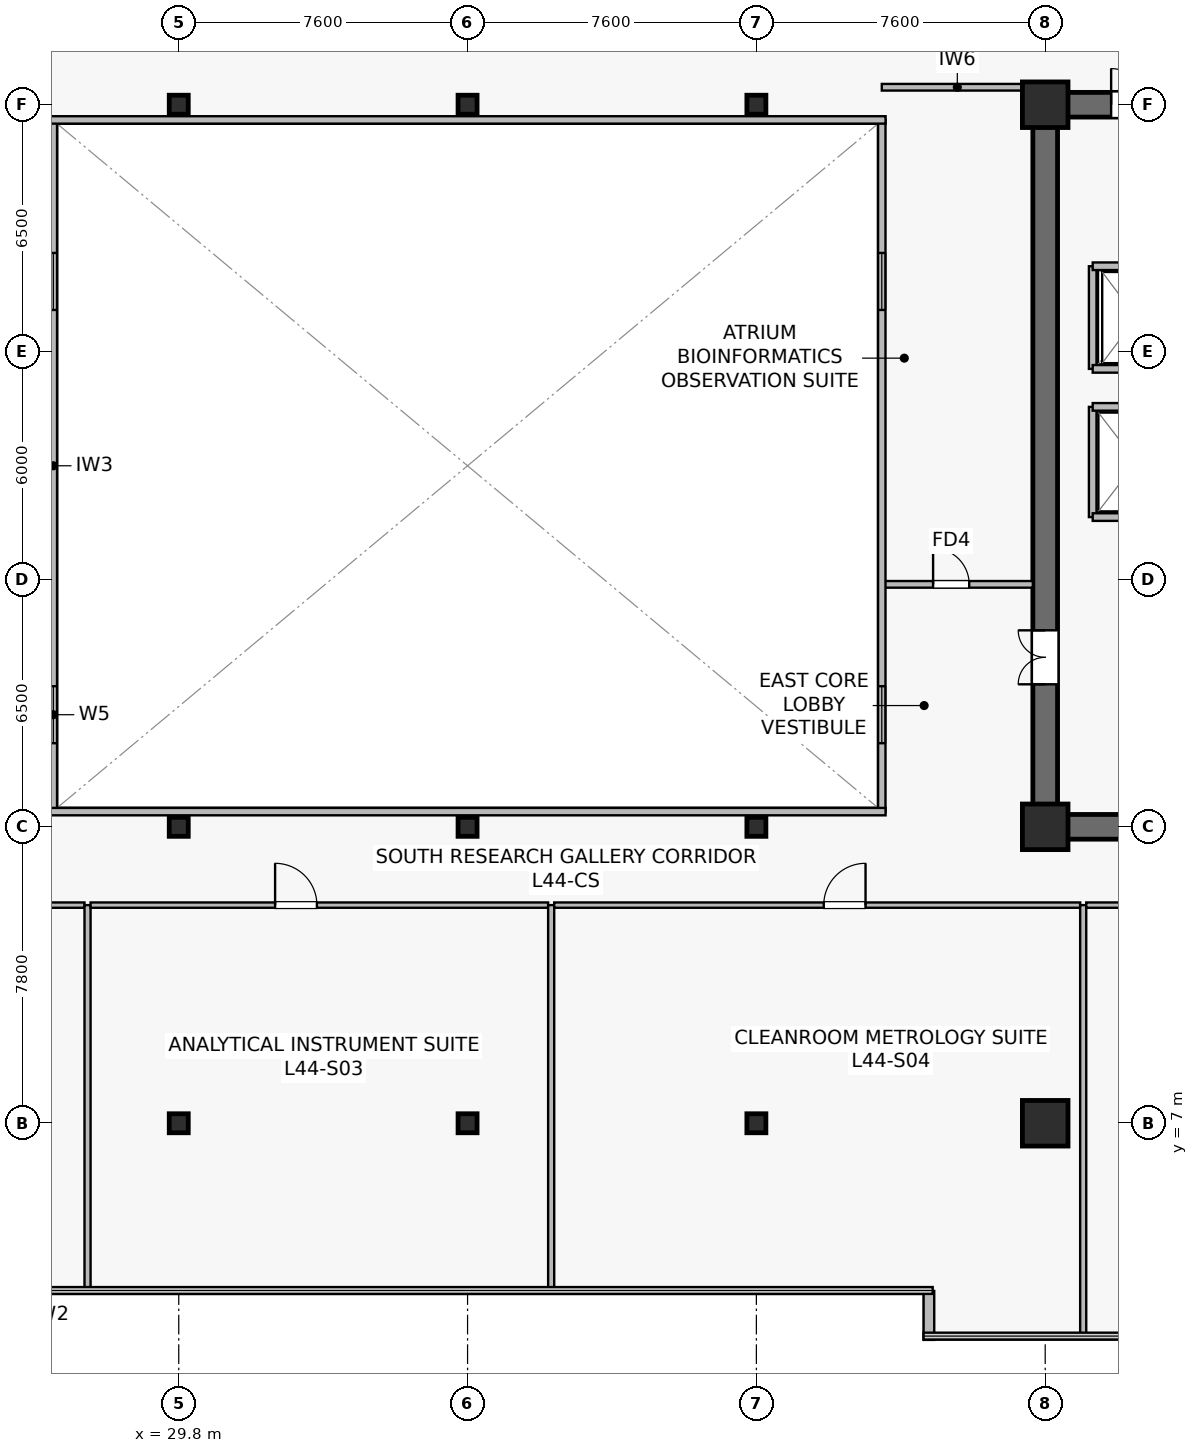
"""IFC4 building model, lengths in metres.
Left out: names, types, materials, properties, quantities, classifications, styles, units other than length and angle.
Written with IfcOpenShell. Run it as: python <this file> out.ifc"""

import sys

from ifc_helpers import new_model, si_unit, direction, frame, frame_2d, origin, origin_2d, place, context, subcontext, project, spatial, rectangle, hollow_rectangle, extrude, source, transform, mapped, element, fill, save


model = new_model("IFC4")
c1 = context("Model", 3, precision=1e-05, world=origin(), true_north=direction((0.0, 1.0)))
c2 = subcontext(c1, "Body", "Model", "MODEL_VIEW")
j1 = project(units=[si_unit("LENGTHUNIT", "METRE"), si_unit("PLANEANGLEUNIT", "RADIAN")], contexts=[c1])
p1 = place(None, origin())
s1 = spatial("IfcSite", under=j1, at=p1, CompositionType="ELEMENT")
p2 = place(p1, origin())
s2 = spatial("IfcBuilding", under=s1, at=p2, CompositionType="ELEMENT")
p3 = place(p2, frame((0.0, 0.0, 183.0)))
s3 = spatial("IfcBuildingStorey", under=s2, at=p3, CompositionType="ELEMENT", Elevation=183.0)
p4 = place(p3, frame((52.275, 14.8, 0.0), z_axis=(0.0, 0.0, 1.0), x_axis=(1.0, 0.0, 0.0)))
e1 = element("IfcWall", 1, at=p4, inside=s3, PredefinedType="SHEAR", context=c2, shape_type="SweptSolid", body=[
    extrude(rectangle(XDim=15.45, YDim=0.65, at=frame_2d((7.725, 0.0))), origin(), (0.0, 0.0, 1.0), 3.79),
])
p5 = place(p3, frame((52.275, 33.8, 0.0), z_axis=(0.0, 0.0, 1.0), x_axis=(1.0, 0.0, 0.0)))
e2 = element("IfcWall", 2, at=p5, inside=s3, PredefinedType="SHEAR", context=c2, shape_type="SweptSolid", body=[
    extrude(rectangle(XDim=15.45, YDim=0.65, at=frame_2d((7.725, 0.0))), origin(), (0.0, 0.0, 1.0), 3.79),
])
p6 = place(p5, frame((8.825, 0.0, 0.0)))
e3 = element("IfcOpeningElement", 3, at=p6, cuts=e2, PredefinedType="OPENING", context=c2, shape_type="SweptSolid", body=[
    extrude(rectangle(XDim=0.95, YDim=2.15, at=frame_2d((0.475, 1.075))), frame((0.0, 0.335, 0.0), z_axis=(0.0, -1.0, 0.0), x_axis=(1.0, 0.0, 0.0)), (0.0, 0.0, 1.0), 0.67),
])
p7 = place(p5, frame((5.46, 0.0, 0.0)))
e4 = element("IfcOpeningElement", 4, at=p7, cuts=e2, PredefinedType="OPENING", context=c2, shape_type="SweptSolid", body=[
    extrude(rectangle(XDim=0.95, YDim=2.15, at=frame_2d((0.475, 1.075))), frame((0.0, 0.335, 0.0), z_axis=(0.0, -1.0, 0.0), x_axis=(1.0, 0.0, 0.0)), (0.0, 0.0, 1.0), 0.67),
])
p8 = place(p5, frame((2.06, 0.0, 0.0)))
e5 = element("IfcOpeningElement", 5, at=p8, cuts=e2, PredefinedType="OPENING", context=c2, shape_type="SweptSolid", body=[
    extrude(rectangle(XDim=0.95, YDim=2.15, at=frame_2d((0.475, 1.075))), frame((0.0, 0.335, 0.0), z_axis=(0.0, -1.0, 0.0), x_axis=(1.0, 0.0, 0.0)), (0.0, 0.0, 1.0), 0.67),
])
p9 = place(p3, frame((52.6, 15.125, 0.0), z_axis=(0.0, 0.0, 1.0), x_axis=(0.0, 1.0, 0.0)))
e6 = element("IfcWall", 6, at=p9, inside=s3, PredefinedType="SHEAR", context=c2, shape_type="SweptSolid", body=[
    extrude(rectangle(XDim=18.35, YDim=0.65, at=frame_2d((9.175, 0.0))), origin(), (0.0, 0.0, 1.0), 3.79),
])
p10 = place(p9, frame((3.425, 0.0, 0.0)))
e7 = element("IfcOpeningElement", 7, at=p10, cuts=e6, PredefinedType="OPENING", context=c2, shape_type="SweptSolid", body=[
    extrude(rectangle(XDim=1.42, YDim=2.2, at=frame_2d((0.71, 1.1))), frame((0.0, 0.335, 0.0), z_axis=(0.0, -1.0, 0.0), x_axis=(1.0, 0.0, 0.0)), (0.0, 0.0, 1.0), 0.67),
])
m1 = source(origin(), c2, "Body", "SweptSolid", [
    extrude(rectangle(XDim=1.2, YDim=1.2, at=origin_2d()), origin(), (0.0, 0.0, 1.0), 4.1),
])
for number, where, z_axis, x_axis in (
    (8, (52.6, 7.0, 0.0), (0.0, 0.0, 1.0), (1.0, 0.0, 0.0)),
    (9, (52.6, 14.8, 0.0), (0.0, 0.0, 1.0), (1.0, 0.0, 0.0)),
    (10, (52.6, 33.8, 0.0), (0.0, 0.0, 1.0), (1.0, 0.0, 0.0)),
):
    element("IfcColumn", number, at=place(p3, frame(where, z_axis=z_axis, x_axis=x_axis)), inside=s3, PredefinedType="COLUMN", context=c2, shape_type="MappedRepresentation", body=[
        mapped(m1, transform((0.0, 0.0, 0.0), scale=1.0)),
    ])
m2 = source(origin(), c2, "Body", "SweptSolid", [
    extrude(hollow_rectangle(XDim=0.5, YDim=0.5, WallThickness=0.022, at=origin_2d()), origin(), (0.0, 0.0, 1.0), 4.1),
])
for number, where, z_axis, x_axis in (
    (11, (29.8, 7.0, 0.0), (0.0, 0.0, 1.0), (1.0, 0.0, 0.0)),
    (12, (29.8, 14.8, 0.0), (0.0, 0.0, 1.0), (1.0, 0.0, 0.0)),
    (13, (29.8, 33.8, 0.0), (0.0, 0.0, 1.0), (1.0, 0.0, 0.0)),
    (14, (37.4, 7.0, 0.0), (0.0, 0.0, 1.0), (1.0, 0.0, 0.0)),
    (15, (37.4, 14.8, 0.0), (0.0, 0.0, 1.0), (1.0, 0.0, 0.0)),
    (16, (37.4, 33.8, 0.0), (0.0, 0.0, 1.0), (1.0, 0.0, 0.0)),
    (17, (45.0, 7.0, 0.0), (0.0, 0.0, 1.0), (1.0, 0.0, 0.0)),
    (18, (45.0, 14.8, 0.0), (0.0, 0.0, 1.0), (1.0, 0.0, 0.0)),
    (19, (45.0, 33.8, 0.0), (0.0, 0.0, 1.0), (1.0, 0.0, 0.0)),
):
    element("IfcColumn", number, at=place(p3, frame(where, z_axis=z_axis, x_axis=x_axis)), inside=s3, PredefinedType="COLUMN", context=c2, shape_type="MappedRepresentation", body=[
        mapped(m2, transform((0.0, 0.0, 0.0), scale=1.0)),
    ])
p11 = place(p3, frame((49.54, 2.588, 0.0), z_axis=(0.0, 0.0, 1.0), x_axis=(0.0, -1.0, 0.0)))
e20 = element("IfcWall", 20, at=p11, inside=s3, PredefinedType="STANDARD", context=c2, shape_type="SweptSolid", body=[
    extrude(rectangle(XDim=1.288, YDim=0.28, at=frame_2d((0.644, 0.0))), origin(), (0.0, 0.0, 1.0), 3.79),
])
p12 = place(p3, frame((53.85, 26.85, 0.0), z_axis=(0.0, 0.0, 1.0), x_axis=(0.0, 1.0, 0.0)))
e21 = element("IfcWall", 21, at=p12, inside=s3, PredefinedType="SOLIDWALL", context=c2, shape_type="SweptSolid", body=[
    extrude(rectangle(XDim=2.7, YDim=0.2, at=frame_2d((1.35, 0.0))), origin(), (0.0, 0.0, 1.0), 3.79),
])
p13 = place(p3, frame((53.85, 29.55, 0.0), z_axis=(0.0, 0.0, 1.0), x_axis=(1.0, 0.0, 0.0)))
e22 = element("IfcWall", 22, at=p13, inside=s3, PredefinedType="SOLIDWALL", context=c2, shape_type="SweptSolid", body=[
    extrude(rectangle(XDim=2.19, YDim=0.2, at=frame_2d((1.095, 0.0))), origin(), (0.0, 0.0, 1.0), 3.79),
])
p14 = place(p3, frame((53.85, 26.85, 0.0), z_axis=(0.0, 0.0, 1.0), x_axis=(1.0, 0.0, 0.0)))
e23 = element("IfcWall", 23, at=p14, inside=s3, PredefinedType="SOLIDWALL", context=c2, shape_type="SweptSolid", body=[
    extrude(rectangle(XDim=2.19, YDim=0.2, at=frame_2d((1.095, 0.0))), origin(), (0.0, 0.0, 1.0), 3.187),
])
p15 = place(p3, frame((53.85, 22.95, 0.0), z_axis=(0.0, 0.0, 1.0), x_axis=(0.0, 1.0, 0.0)))
e24 = element("IfcWall", 24, at=p15, inside=s3, PredefinedType="SOLIDWALL", context=c2, shape_type="SweptSolid", body=[
    extrude(rectangle(XDim=2.9, YDim=0.2, at=frame_2d((1.45, 0.0))), origin(), (0.0, 0.0, 1.0), 2.925),
])
for number, where, z_axis, x_axis in (
    (25, (53.85, 25.85, 0.0), (0.0, 0.0, 1.0), (1.0, 0.0, 0.0)),
    (26, (53.85, 22.95, 0.0), (0.0, 0.0, 1.0), (1.0, 0.0, 0.0)),
):
    element("IfcWall", number, at=place(p3, frame(where, z_axis=z_axis, x_axis=x_axis)), inside=s3, PredefinedType="SOLIDWALL", context=c2, shape_type="SweptSolid", body=[
        extrude(rectangle(XDim=2.19, YDim=0.2, at=frame_2d((1.095, 0.0))), origin(), (0.0, 0.0, 1.0), 3.79),
    ])
p16 = place(p3, frame((48.3, 34.26, 0.0), z_axis=(0.0, 0.0, 1.0), x_axis=(1.0, 0.0, 0.0)))
e27 = element("IfcWall", 27, at=p16, inside=s3, PredefinedType="PARTITIONING", context=c2, shape_type="SweptSolid", body=[
    extrude(rectangle(XDim=3.975, YDim=0.175, at=frame_2d((1.987, 0.0))), origin(), (0.0, 0.0, 1.0), 3.475),
])
p17 = place(p3, frame((48.3, 21.18, 0.0), z_axis=(0.0, 0.0, 1.0), x_axis=(1.0, 0.0, 0.0)))
e28 = element("IfcWall", 28, at=p17, inside=s3, PredefinedType="PARTITIONING", context=c2, shape_type="SweptSolid", body=[
    extrude(rectangle(XDim=3.975, YDim=0.175, at=frame_2d((1.987, 0.0))), origin(), (0.0, 0.0, 1.0), 3.79),
])
p18 = place(p17, frame((1.35, 0.0, 0.0)))
e29 = element("IfcOpeningElement", 29, at=p18, cuts=e28, PredefinedType="OPENING", context=c2, shape_type="SweptSolid", body=[
    extrude(rectangle(XDim=0.95, YDim=2.15, at=frame_2d((0.475, 1.075))), frame((0.0, 0.098, 0.0), z_axis=(0.0, -1.0, 0.0), x_axis=(1.0, 0.0, 0.0)), (0.0, 0.0, 1.0), 0.195),
])
p19 = place(p3, frame((26.5, 15.2, 0.0), z_axis=(0.0, 0.0, 1.0), x_axis=(0.0, 1.0, 0.0)))
e30 = element("IfcWall", 30, at=p19, inside=s3, PredefinedType="SOLIDWALL", context=c2, shape_type="SweptSolid", body=[
    extrude(rectangle(XDim=18.2, YDim=0.195, at=frame_2d((9.1, 0.0))), origin(), (0.0, 0.0, 1.0), 3.79),
])
p20 = place(p19, frame((1.8, 0.0, 0.9)))
e31 = element("IfcOpeningElement", 31, at=p20, cuts=e30, PredefinedType="OPENING", context=c2, shape_type="SweptSolid", body=[
    extrude(rectangle(XDim=1.5, YDim=1.4, at=frame_2d((0.75, 0.7))), frame((0.0, 0.107, 0.0), z_axis=(0.0, -1.0, 0.0), x_axis=(1.0, 0.0, 0.0)), (0.0, 0.0, 1.0), 0.215),
])
p21 = place(p19, frame((13.2, 0.0, 0.9)))
e32 = element("IfcOpeningElement", 32, at=p21, cuts=e30, PredefinedType="OPENING", context=c2, shape_type="SweptSolid", body=[
    extrude(rectangle(XDim=1.5, YDim=1.4, at=frame_2d((0.75, 0.7))), frame((0.0, 0.107, 0.0), z_axis=(0.0, -1.0, 0.0), x_axis=(1.0, 0.0, 0.0)), (0.0, 0.0, 1.0), 0.215),
])
p22 = place(p3, frame((48.3, 15.2, 0.0), z_axis=(0.0, 0.0, 1.0), x_axis=(0.0, 1.0, 0.0)))
e33 = element("IfcWall", 33, at=p22, inside=s3, PredefinedType="SOLIDWALL", context=c2, shape_type="SweptSolid", body=[
    extrude(rectangle(XDim=18.2, YDim=0.195, at=frame_2d((9.1, 0.0))), origin(), (0.0, 0.0, 1.0), 3.79),
])
p23 = place(p22, frame((1.8, 0.0, 0.9)))
e34 = element("IfcOpeningElement", 34, at=p23, cuts=e33, PredefinedType="OPENING", context=c2, shape_type="SweptSolid", body=[
    extrude(rectangle(XDim=1.5, YDim=1.4, at=frame_2d((0.75, 0.7))), frame((0.0, 0.107, 0.0), z_axis=(0.0, -1.0, 0.0), x_axis=(1.0, 0.0, 0.0)), (0.0, 0.0, 1.0), 0.215),
])
p24 = place(p22, frame((13.2, 0.0, 0.9)))
e35 = element("IfcOpeningElement", 35, at=p24, cuts=e33, PredefinedType="OPENING", context=c2, shape_type="SweptSolid", body=[
    extrude(rectangle(XDim=1.5, YDim=1.4, at=frame_2d((0.75, 0.7))), frame((0.0, 0.107, 0.0), z_axis=(0.0, -1.0, 0.0), x_axis=(1.0, 0.0, 0.0)), (0.0, 0.0, 1.0), 0.215),
])
for number, where, z_axis, x_axis in (
    (36, (26.4, 15.2, 0.0), (0.0, 0.0, 1.0), (1.0, 0.0, 0.0)),
    (37, (26.4, 33.4, 0.0), (0.0, 0.0, 1.0), (1.0, 0.0, 0.0)),
):
    element("IfcWall", number, at=place(p3, frame(where, z_axis=z_axis, x_axis=x_axis)), inside=s3, PredefinedType="SOLIDWALL", context=c2, shape_type="SweptSolid", body=[
        extrude(rectangle(XDim=22.0, YDim=0.195, at=frame_2d((11.0, 0.0))), origin(), (0.0, 0.0, 1.0), 3.79),
    ])
p25 = place(p3, frame((15.68, 12.74, 0.0), z_axis=(0.0, 0.0, 1.0), x_axis=(1.0, 0.0, 0.0)))
e38 = element("IfcWall", 38, at=p25, inside=s3, PredefinedType="PARTITIONING", context=c2, shape_type="SweptSolid", body=[
    extrude(rectangle(XDim=11.64, YDim=0.14, at=frame_2d((5.82, 0.0))), origin(), (0.0, 0.0, 1.0), 3.187),
])
p26 = place(p25, frame((5.86, 0.0, 0.0)))
e39 = element("IfcOpeningElement", 39, at=p26, cuts=e38, PredefinedType="OPENING", context=c2, shape_type="SweptSolid", body=[
    extrude(rectangle(XDim=1.1, YDim=2.18, at=frame_2d((0.55, 1.09))), frame((0.0, 0.08, 0.0), z_axis=(0.0, -1.0, 0.0), x_axis=(1.0, 0.0, 0.0)), (0.0, 0.0, 1.0), 0.16),
])
p27 = place(p3, frame((27.4, 2.61, 0.0), z_axis=(0.0, 0.0, 1.0), x_axis=(0.0, 1.0, 0.0)))
e40 = element("IfcWall", 40, at=p27, inside=s3, PredefinedType="PARTITIONING", context=c2, shape_type="SweptSolid", body=[
    extrude(rectangle(XDim=10.13, YDim=0.16, at=frame_2d((5.065, 0.0))), origin(), (0.0, 0.0, 1.0), 3.075),
])
p28 = place(p3, frame((27.48, 12.74, 0.0), z_axis=(0.0, 0.0, 1.0), x_axis=(1.0, 0.0, 0.0)))
e41 = element("IfcWall", 41, at=p28, inside=s3, PredefinedType="PARTITIONING", context=c2, shape_type="SweptSolid", body=[
    extrude(rectangle(XDim=12.04, YDim=0.14, at=frame_2d((6.02, 0.0))), origin(), (0.0, 0.0, 1.0), 3.187),
])
p29 = place(p28, frame((4.856, 0.0, 0.0)))
e42 = element("IfcOpeningElement", 42, at=p29, cuts=e41, PredefinedType="OPENING", context=c2, shape_type="SweptSolid", body=[
    extrude(rectangle(XDim=1.1, YDim=2.18, at=frame_2d((0.55, 1.09))), frame((0.0, 0.08, 0.0), z_axis=(0.0, -1.0, 0.0), x_axis=(1.0, 0.0, 0.0)), (0.0, 0.0, 1.0), 0.16),
])
p30 = place(p3, frame((39.6, 2.61, 0.0), z_axis=(0.0, 0.0, 1.0), x_axis=(0.0, 1.0, 0.0)))
e43 = element("IfcWall", 43, at=p30, inside=s3, PredefinedType="PARTITIONING", context=c2, shape_type="SweptSolid", body=[
    extrude(rectangle(XDim=10.13, YDim=0.16, at=frame_2d((5.065, 0.0))), origin(), (0.0, 0.0, 1.0), 3.075),
])
p31 = place(p3, frame((39.68, 12.74, 0.0), z_axis=(0.0, 0.0, 1.0), x_axis=(1.0, 0.0, 0.0)))
e44 = element("IfcWall", 44, at=p31, inside=s3, PredefinedType="PARTITIONING", context=c2, shape_type="SweptSolid", body=[
    extrude(rectangle(XDim=13.84, YDim=0.14, at=frame_2d((6.92, 0.0))), origin(), (0.0, 0.0, 1.0), 3.187),
])
p32 = place(p31, frame((7.092, 0.0, 0.0)))
e45 = element("IfcOpeningElement", 45, at=p32, cuts=e44, PredefinedType="OPENING", context=c2, shape_type="SweptSolid", body=[
    extrude(rectangle(XDim=1.1, YDim=2.18, at=frame_2d((0.55, 1.09))), frame((0.0, 0.08, 0.0), z_axis=(0.0, -1.0, 0.0), x_axis=(1.0, 0.0, 0.0)), (0.0, 0.0, 1.0), 0.16),
])
p33 = place(p3, frame((53.6, 1.41, 0.0), z_axis=(0.0, 0.0, 1.0), x_axis=(0.0, 1.0, 0.0)))
e46 = element("IfcWall", 46, at=p33, inside=s3, PredefinedType="PARTITIONING", context=c2, shape_type="SweptSolid", body=[
    extrude(rectangle(XDim=11.33, YDim=0.16, at=frame_2d((5.665, 0.0))), origin(), (0.0, 0.0, 1.0), 3.075),
])
p34 = place(p3, frame((53.68, 12.74, 0.0), z_axis=(0.0, 0.0, 1.0), x_axis=(1.0, 0.0, 0.0)))
e47 = element("IfcWall", 47, at=p34, inside=s3, PredefinedType="PARTITIONING", context=c2, shape_type="SweptSolid", body=[
    extrude(rectangle(XDim=14.14, YDim=0.14, at=frame_2d((7.07, 0.0))), origin(), (0.0, 0.0, 1.0), 3.187),
])
p35 = place(p34, frame((5.78, 0.0, 0.0)))
e48 = element("IfcOpeningElement", 48, at=p35, cuts=e47, PredefinedType="OPENING", context=c2, shape_type="SweptSolid", body=[
    extrude(rectangle(XDim=1.1, YDim=2.18, at=frame_2d((0.55, 1.09))), frame((0.0, 0.08, 0.0), z_axis=(0.0, -1.0, 0.0), x_axis=(1.0, 0.0, 0.0)), (0.0, 0.0, 1.0), 0.16),
])
m3 = source(origin(), c2, "Body", "SweptSolid", [
    extrude(rectangle(XDim=1.5, YDim=1.4, at=frame_2d((0.75, 0.7))), frame((0.0, 0.03, 0.0), z_axis=(0.0, -1.0, 0.0), x_axis=(1.0, 0.0, 0.0)), (0.0, 0.0, 1.0), 0.06),
])
p36 = place(p20, origin())
e49 = element("IfcWindow", 49, at=p36, inside=s3, PartitioningType="SINGLE_PANEL", PredefinedType="WINDOW", context=c2, shape_type="MappedRepresentation", body=[
    mapped(m3, transform((0.0, 0.0, 0.0), scale=1.0)),
])
fill(e31, e49)
p37 = place(p21, origin())
e50 = element("IfcWindow", 50, at=p37, inside=s3, PartitioningType="SINGLE_PANEL", PredefinedType="WINDOW", context=c2, shape_type="MappedRepresentation", body=[
    mapped(m3, transform((0.0, 0.0, 0.0), scale=1.0)),
])
fill(e32, e50)
p38 = place(p23, origin())
e51 = element("IfcWindow", 51, at=p38, inside=s3, PartitioningType="SINGLE_PANEL", PredefinedType="WINDOW", context=c2, shape_type="MappedRepresentation", body=[
    mapped(m3, transform((0.0, 0.0, 0.0), scale=1.0)),
])
fill(e34, e51)
p39 = place(p24, origin())
e52 = element("IfcWindow", 52, at=p39, inside=s3, PartitioningType="SINGLE_PANEL", PredefinedType="WINDOW", context=c2, shape_type="MappedRepresentation", body=[
    mapped(m3, transform((0.0, 0.0, 0.0), scale=1.0)),
])
fill(e35, e52)
m4 = source(origin(), c2, "Body", "SweptSolid", [
    extrude(rectangle(XDim=1.42, YDim=2.2, at=frame_2d((0.71, 1.1))), frame((0.0, 0.025, 0.0), z_axis=(0.0, -1.0, 0.0), x_axis=(1.0, 0.0, 0.0)), (0.0, 0.0, 1.0), 0.05),
])
p40 = place(p10, origin())
e53 = element("IfcDoor", 53, at=p40, inside=s3, OperationType="DOUBLE_DOOR_SINGLE_SWING", PredefinedType="DOOR", context=c2, shape_type="MappedRepresentation", body=[
    mapped(m4, transform((0.0, 0.0, 0.0), scale=1.0)),
])
fill(e7, e53)
m5 = source(origin(), c2, "Body", "SweptSolid", [
    extrude(rectangle(XDim=0.95, YDim=2.15, at=frame_2d((0.475, 1.075))), frame((0.0, 0.025, 0.0), z_axis=(0.0, -1.0, 0.0), x_axis=(1.0, 0.0, 0.0)), (0.0, 0.0, 1.0), 0.05),
])
p41 = place(p8, origin())
e54 = element("IfcDoor", 54, at=p41, inside=s3, OperationType="SINGLE_SWING_LEFT", PredefinedType="DOOR", context=c2, shape_type="MappedRepresentation", body=[
    mapped(m5, transform((0.0, 0.0, 0.0), scale=1.0)),
])
fill(e5, e54)
p42 = place(p18, origin())
e55 = element("IfcDoor", 55, at=p42, inside=s3, OperationType="SINGLE_SWING_LEFT", PredefinedType="DOOR", context=c2, shape_type="MappedRepresentation", body=[
    mapped(m5, transform((0.0, 0.0, 0.0), scale=1.0)),
])
fill(e29, e55)
m6 = source(origin(), c2, "Body", "SweptSolid", [
    extrude(rectangle(XDim=1.1, YDim=2.18, at=frame_2d((0.55, 1.09))), frame((0.0, 0.025, 0.0), z_axis=(0.0, -1.0, 0.0), x_axis=(1.0, 0.0, 0.0)), (0.0, 0.0, 1.0), 0.05),
])
p43 = place(p29, origin())
e56 = element("IfcDoor", 56, at=p43, inside=s3, OperationType="SINGLE_SWING_LEFT", PredefinedType="DOOR", context=c2, shape_type="MappedRepresentation", body=[
    mapped(m6, transform((0.0, 0.0, 0.0), scale=1.0)),
])
fill(e42, e56)
p44 = place(p32, origin())
e57 = element("IfcDoor", 57, at=p44, inside=s3, OperationType="SINGLE_SWING_RIGHT", PredefinedType="DOOR", context=c2, shape_type="MappedRepresentation", body=[
    mapped(m6, transform((0.0, 0.0, 0.0), scale=1.0)),
])
fill(e45, e57)
save(model, sys.argv[1])
